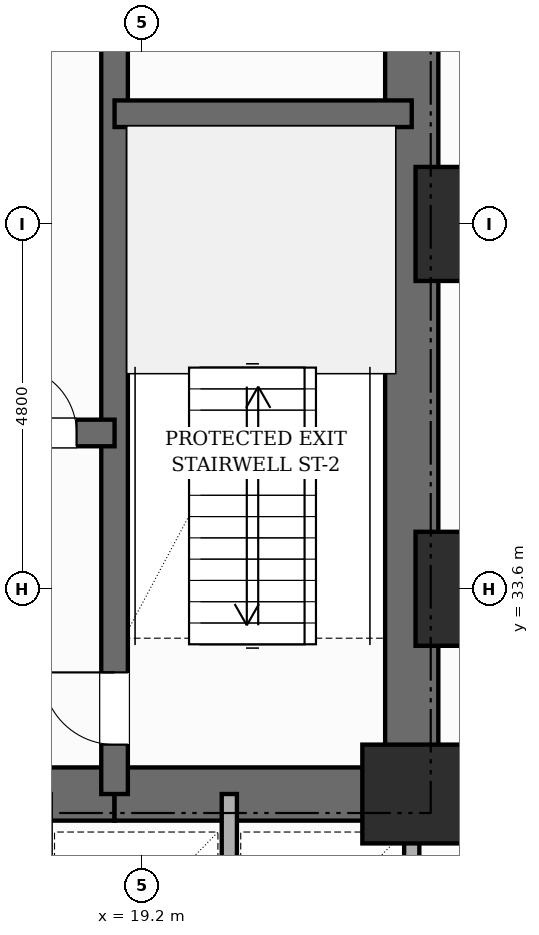
"""IFC4 building model, lengths in metres.
Left out: names, types, materials, properties, quantities, classifications, styles, units other than length and angle.
Written with IfcOpenShell. Run it as: python <this file> out.ifc"""

import sys

from ifc_helpers import new_model, si_unit, direction, frame, frame_2d, origin, origin_2d, place, context, subcontext, project, spatial, rectangle, extrude, element, fill, save


model = new_model("IFC4")
c1 = context("Model", 3, precision=1e-05, world=origin(), true_north=direction((0.0, 1.0)))
c2 = subcontext(c1, "Body", "Model", "MODEL_VIEW")
j1 = project(units=[si_unit("LENGTHUNIT", "METRE"), si_unit("PLANEANGLEUNIT", "RADIAN")], contexts=[c1])
p1 = place(None, origin())
s1 = spatial("IfcSite", under=j1, at=p1, CompositionType="ELEMENT")
p2 = place(p1, origin())
s2 = spatial("IfcBuilding", under=s1, at=p2, CompositionType="ELEMENT")
p3 = place(p2, frame((0.0, 0.0, 5.2)))
s3 = spatial("IfcBuildingStorey", under=s2, at=p3, CompositionType="ELEMENT", Elevation=5.2)
p4 = place(p3, frame((22.75, 30.55, 0.0), z_axis=(0.0, 0.0, 1.0), x_axis=(0.0, 1.0, 0.0)))
e1 = element("IfcWall", 1, at=p4, inside=s3, PredefinedType="SHEAR", context=c2, shape_type="SweptSolid", body=[
    extrude(rectangle(XDim=15.6, YDim=0.7, at=frame_2d((7.8, 0.0))), origin(), (0.0, 0.0, 1.0), 4.8),
])
p5 = place(p4, frame((10.8, 0.0, 0.0)))
e2 = element("IfcOpeningElement", 2, at=p5, cuts=e1, PredefinedType="OPENING", context=c2, shape_type="SweptSolid", body=[
    extrude(rectangle(XDim=1.0, YDim=2.15, at=frame_2d((0.5, 1.075))), frame((0.0, 0.36, 0.0), z_axis=(0.0, -1.0, 0.0), x_axis=(1.0, 0.0, 0.0)), (0.0, 0.0, 1.0), 0.72),
])
p6 = place(p3, frame((9.96, 30.9, 0.0), z_axis=(0.0, 0.0, 1.0), x_axis=(1.0, 0.0, 0.0)))
e3 = element("IfcWall", 3, at=p6, inside=s3, PredefinedType="SHEAR", context=c2, shape_type="SweptSolid", body=[
    extrude(rectangle(XDim=8.88, YDim=0.7, at=frame_2d((4.44, 0.0))), origin(), (0.0, 0.0, 1.0), 4.8),
])
p7 = place(p6, frame((4.09, 0.0, 0.0)))
e4 = element("IfcOpeningElement", 4, at=p7, cuts=e3, PredefinedType="OPENING", context=c2, shape_type="SweptSolid", body=[
    extrude(rectangle(XDim=1.0, YDim=2.15, at=frame_2d((0.5, 1.075))), frame((0.0, 0.36, 0.0), z_axis=(0.0, -1.0, 0.0), x_axis=(1.0, 0.0, 0.0)), (0.0, 0.0, 1.0), 0.72),
])
p8 = place(p3, frame((18.84, 30.9, 0.0), z_axis=(0.0, 0.0, 1.0), x_axis=(1.0, 0.0, 0.0)))
e5 = element("IfcWall", 5, at=p8, inside=s3, PredefinedType="SHEAR", context=c2, shape_type="SweptSolid", body=[
    extrude(rectangle(XDim=3.91, YDim=0.7, at=frame_2d((1.955, 0.0))), origin(), (0.0, 0.0, 1.0), 4.8),
])
p9 = place(p3, frame((18.84, 30.9, 0.0), z_axis=(0.0, 0.0, 1.0), x_axis=(0.0, 1.0, 0.0)))
e6 = element("IfcWall", 6, at=p9, inside=s3, PredefinedType="SHEAR", context=c2, shape_type="SweptSolid", body=[
    extrude(rectangle(XDim=14.9, YDim=0.35, at=frame_2d((7.45, 0.0))), origin(), (0.0, 0.0, 1.0), 4.8),
])
p10 = place(p9, frame((0.65, 0.0, 0.0)))
e7 = element("IfcOpeningElement", 7, at=p10, cuts=e6, PredefinedType="OPENING", context=c2, shape_type="SweptSolid", body=[
    extrude(rectangle(XDim=0.95, YDim=2.1, at=frame_2d((0.475, 1.05))), frame((0.0, 0.185, 0.0), z_axis=(0.0, -1.0, 0.0), x_axis=(1.0, 0.0, 0.0)), (0.0, 0.0, 1.0), 0.37),
])
p11 = place(p9, frame((10.45, 0.0, 0.0)))
e8 = element("IfcOpeningElement", 8, at=p11, cuts=e6, PredefinedType="OPENING", context=c2, shape_type="SweptSolid", body=[
    extrude(rectangle(XDim=1.0, YDim=2.15, at=frame_2d((0.5, 1.075))), frame((0.0, 0.185, 0.0), z_axis=(0.0, -1.0, 0.0), x_axis=(1.0, 0.0, 0.0)), (0.0, 0.0, 1.0), 0.37),
])
p12 = place(p3, frame((18.84, 39.85, 0.0), z_axis=(0.0, 0.0, 1.0), x_axis=(1.0, 0.0, 0.0)))
e9 = element("IfcWall", 9, at=p12, inside=s3, PredefinedType="SHEAR", context=c2, shape_type="SweptSolid", body=[
    extrude(rectangle(XDim=3.91, YDim=0.35, at=frame_2d((1.955, 0.0))), origin(), (0.0, 0.0, 1.0), 4.8),
])
p13 = place(p3, frame((9.96, 35.65, 0.0), z_axis=(0.0, 0.0, 1.0), x_axis=(1.0, 0.0, 0.0)))
e10 = element("IfcWall", 10, at=p13, inside=s3, PredefinedType="SHEAR", context=c2, shape_type="SweptSolid", body=[
    extrude(rectangle(XDim=8.88, YDim=0.35, at=frame_2d((4.44, 0.0))), origin(), (0.0, 0.0, 1.0), 4.8),
])
p14 = place(p13, frame((0.84, 0.0, 0.0)))
e11 = element("IfcOpeningElement", 11, at=p14, cuts=e10, PredefinedType="OPENING", context=c2, shape_type="SweptSolid", body=[
    extrude(rectangle(XDim=1.1, YDim=2.15, at=frame_2d((0.55, 1.075))), frame((0.0, 0.185, 0.0), z_axis=(0.0, -1.0, 0.0), x_axis=(1.0, 0.0, 0.0)), (0.0, 0.0, 1.0), 0.37),
])
p15 = place(p13, frame((5.24, 0.0, 0.0)))
e12 = element("IfcOpeningElement", 12, at=p15, cuts=e10, PredefinedType="OPENING", context=c2, shape_type="SweptSolid", body=[
    extrude(rectangle(XDim=1.1, YDim=2.15, at=frame_2d((0.55, 1.075))), frame((0.0, 0.185, 0.0), z_axis=(0.0, -1.0, 0.0), x_axis=(1.0, 0.0, 0.0)), (0.0, 0.0, 1.0), 0.37),
])
p16 = place(p13, frame((7.5, 0.0, 0.0)))
e13 = element("IfcOpeningElement", 13, at=p16, cuts=e10, PredefinedType="OPENING", context=c2, shape_type="SweptSolid", body=[
    extrude(rectangle(XDim=0.88, YDim=2.1, at=frame_2d((0.44, 1.05))), frame((0.0, 0.185, 0.0), z_axis=(0.0, -1.0, 0.0), x_axis=(1.0, 0.0, 0.0)), (0.0, 0.0, 1.0), 0.37),
])
p17 = place(p3, frame((22.75, 30.9, 0.0), z_axis=(0.0, 0.0, 1.0), x_axis=(1.0, 0.0, 0.0)))
e14 = element("IfcColumn", 14, at=p17, inside=s3, PredefinedType="COLUMN", context=c2, shape_type="SweptSolid", body=[
    extrude(rectangle(XDim=1.3, YDim=1.3, at=origin_2d()), origin(), (0.0, 0.0, 1.0), 4.8),
])
for number, where, z_axis, x_axis in (
    (15, (23.55, 33.6, 0.0), (0.0, 0.0, 1.0), (1.0, 0.0, 0.0)),
    (16, (23.55, 38.4, 0.0), (0.0, 0.0, 1.0), (1.0, 0.0, 0.0)),
):
    element("IfcColumn", number, at=place(p3, frame(where, z_axis=z_axis, x_axis=x_axis)), inside=s3, PredefinedType="USERDEFINED", context=c2, shape_type="SweptSolid", body=[
        extrude(rectangle(XDim=1.5, YDim=1.5, at=origin_2d()), origin(), (0.0, 0.0, 1.0), 4.8),
    ])
p18 = place(p3, frame((22.75, 27.9, 0.0), z_axis=(0.0, 0.0, 1.0), x_axis=(0.0, 1.0, 0.0)))
e17 = element("IfcWall", 17, at=p18, inside=s3, PredefinedType="POLYGONAL", context=c2, shape_type="SweptSolid", body=[
    extrude(rectangle(XDim=3.0, YDim=0.2, at=frame_2d((1.5, 0.0))), origin(), (0.0, 0.0, 1.0), 4.52),
])
p19 = place(p3, frame((20.35, 28.0, 0.0), z_axis=(0.0, 0.0, 1.0), x_axis=(0.0, 1.0, 0.0)))
e18 = element("IfcWall", 18, at=p19, inside=s3, PredefinedType="POLYGONAL", context=c2, shape_type="SweptSolid", body=[
    extrude(rectangle(XDim=2.9, YDim=0.2, at=frame_2d((1.45, 0.0))), origin(), (0.0, 0.0, 1.0), 4.52),
])
p20 = place(p10, origin())
e19 = element("IfcDoor", 19, at=p20, inside=s3, OperationType="SINGLE_SWING_RIGHT", PredefinedType="DOOR", context=c2, shape_type="SweptSolid", body=[
    extrude(rectangle(XDim=0.95, YDim=2.1, at=frame_2d((0.475, 1.05))), frame((0.0, 0.025, 0.0), z_axis=(0.0, -1.0, 0.0), x_axis=(1.0, 0.0, 0.0)), (0.0, 0.0, 1.0), 0.05),
])
fill(e7, e19)
p21 = place(p16, origin())
e20 = element("IfcDoor", 20, at=p21, inside=s3, OperationType="SINGLE_SWING_LEFT", PredefinedType="DOOR", context=c2, shape_type="SweptSolid", body=[
    extrude(rectangle(XDim=0.88, YDim=2.1, at=frame_2d((0.44, 1.05))), frame((0.0, 0.025, 0.0), z_axis=(0.0, -1.0, 0.0), x_axis=(1.0, 0.0, 0.0)), (0.0, 0.0, 1.0), 0.05),
])
fill(e13, e20)
save(model, sys.argv[1])
